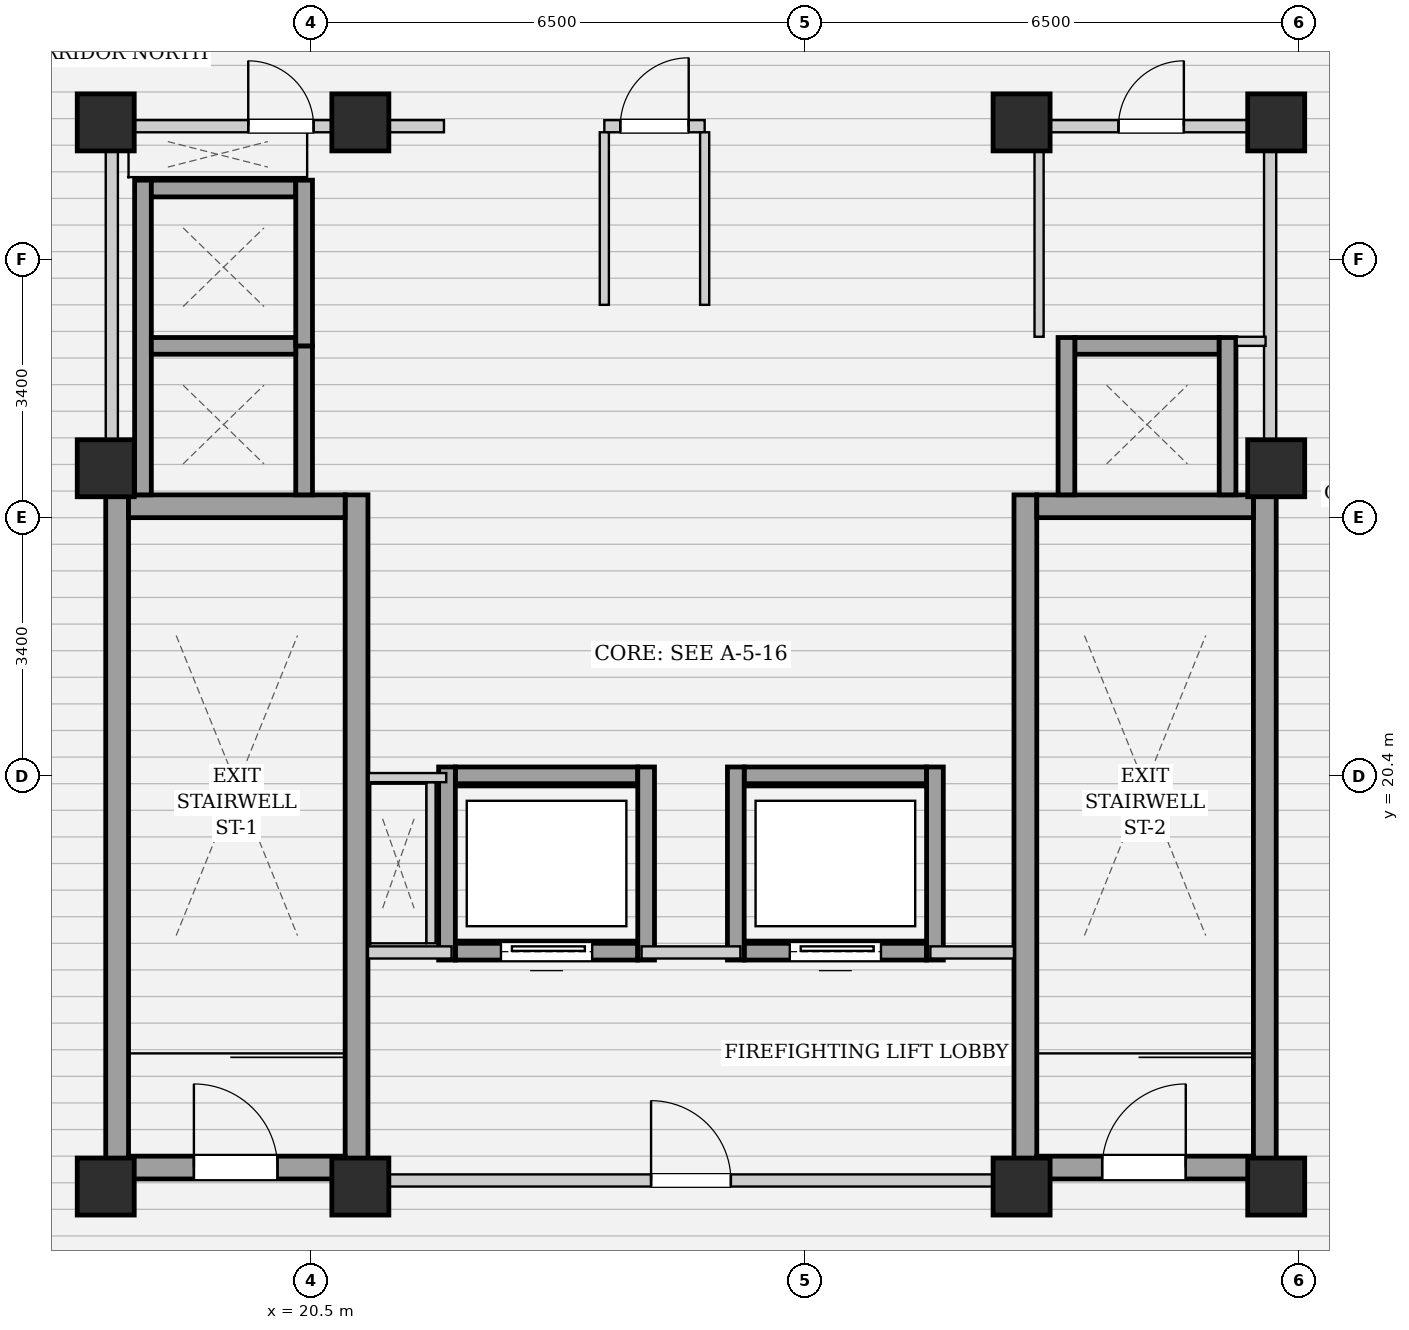
"""IFC4 building model, lengths in metres.
Left out: names, types, materials, properties, quantities, classifications, styles, units other than length and angle.
Written with IfcOpenShell. Run it as: python <this file> out.ifc"""

import sys

from ifc_helpers import new_model, si_unit, direction, frame, frame_2d, origin, origin_2d, place, context, subcontext, project, spatial, rectangle, extrude, element, fill, save


model = new_model("IFC4")
c1 = context("Model", 3, precision=1e-05, world=origin(), true_north=direction((0.0, 1.0)))
c2 = subcontext(c1, "Body", "Model", "MODEL_VIEW")
j1 = project(units=[si_unit("LENGTHUNIT", "METRE"), si_unit("PLANEANGLEUNIT", "RADIAN")], contexts=[c1])
p1 = place(None, origin())
s1 = spatial("IfcSite", under=j1, at=p1, CompositionType="ELEMENT")
p2 = place(p1, origin())
s2 = spatial("IfcBuilding", under=s1, at=p2, CompositionType="ELEMENT")
p3 = place(p2, frame((0.0, 0.0, 261.5)))
s3 = spatial("IfcBuildingStorey", under=s2, at=p3, CompositionType="ELEMENT", Elevation=261.5)
for number, where, z_axis, x_axis in (
    (1, (17.8, 15.0, 0.0), (0.0, 0.0, 1.0), (1.0, 0.0, 0.0)),
    (2, (21.15, 15.0, 0.0), (0.0, 0.0, 1.0), (1.0, 0.0, 0.0)),
    (3, (29.85, 15.0, 0.0), (0.0, 0.0, 1.0), (1.0, 0.0, 0.0)),
    (4, (33.2, 15.0, 0.0), (0.0, 0.0, 1.0), (1.0, 0.0, 0.0)),
    (5, (17.8, 29.0, 0.0), (0.0, 0.0, 1.0), (1.0, 0.0, 0.0)),
    (6, (21.15, 29.0, 0.0), (0.0, 0.0, 1.0), (1.0, 0.0, 0.0)),
    (7, (29.85, 29.0, 0.0), (0.0, 0.0, 1.0), (1.0, 0.0, 0.0)),
    (8, (33.2, 29.0, 0.0), (0.0, 0.0, 1.0), (1.0, 0.0, 0.0)),
    (9, (17.8, 24.45, 0.0), (0.0, 0.0, 1.0), (1.0, 0.0, 0.0)),
    (10, (33.2, 24.45, 0.0), (0.0, 0.0, 1.0), (1.0, 0.0, 0.0)),
):
    element("IfcColumn", number, at=place(p3, frame(where, z_axis=z_axis, x_axis=x_axis)), inside=s3, PredefinedType="COLUMN", context=c2, shape_type="SweptSolid", body=[
        extrude(rectangle(XDim=0.75, YDim=0.75, at=origin_2d()), origin(), (0.0, 0.0, 1.0), 12.95),
    ])
for number, where, z_axis, x_axis in (
    (11, (17.95, 15.1, 0.0), (0.0, 0.0, 1.0), (0.0, 1.0, 0.0)),
    (12, (21.1, 15.1, 0.0), (0.0, 0.0, 1.0), (0.0, 1.0, 0.0)),
):
    element("IfcWall", number, at=place(p3, frame(where, z_axis=z_axis, x_axis=x_axis)), inside=s3, PredefinedType="SHEAR", context=c2, shape_type="SweptSolid", body=[
        extrude(rectangle(XDim=9.0, YDim=0.3, at=frame_2d((4.5, 0.0))), origin(), (0.0, 0.0, 1.0), 13.2),
    ])
p4 = place(p3, frame((18.1, 23.95, 0.0), z_axis=(0.0, 0.0, 1.0), x_axis=(1.0, 0.0, 0.0)))
e13 = element("IfcWall", 13, at=p4, inside=s3, PredefinedType="SHEAR", context=c2, shape_type="SweptSolid", body=[
    extrude(rectangle(XDim=2.85, YDim=0.3, at=frame_2d((1.425, 0.0))), origin(), (0.0, 0.0, 1.0), 13.2),
])
p5 = place(p3, frame((18.1, 15.25, 0.0), z_axis=(0.0, 0.0, 1.0), x_axis=(1.0, 0.0, 0.0)))
e14 = element("IfcWall", 14, at=p5, inside=s3, PredefinedType="SHEAR", context=c2, shape_type="SweptSolid", body=[
    extrude(rectangle(XDim=2.85, YDim=0.3, at=frame_2d((1.425, 0.0))), origin(), (0.0, 0.0, 1.0), 13.2),
])
p6 = place(p5, frame((0.86, 0.0, 0.0)))
e15 = element("IfcOpeningElement", 15, at=p6, cuts=e14, PredefinedType="OPENING", context=c2, shape_type="SweptSolid", body=[
    extrude(rectangle(XDim=1.1, YDim=2.05, at=frame_2d((0.55, 1.025))), frame((0.0, 0.16, 0.0), z_axis=(0.0, -1.0, 0.0), x_axis=(1.0, 0.0, 0.0)), (0.0, 0.0, 1.0), 0.32),
])
for number, where, z_axis, x_axis in (
    (16, (29.9, 15.1, 0.0), (0.0, 0.0, 1.0), (0.0, 1.0, 0.0)),
    (17, (33.05, 15.1, 0.0), (0.0, 0.0, 1.0), (0.0, 1.0, 0.0)),
):
    element("IfcWall", number, at=place(p3, frame(where, z_axis=z_axis, x_axis=x_axis)), inside=s3, PredefinedType="SHEAR", context=c2, shape_type="SweptSolid", body=[
        extrude(rectangle(XDim=9.0, YDim=0.3, at=frame_2d((4.5, 0.0))), origin(), (0.0, 0.0, 1.0), 13.2),
    ])
p7 = place(p3, frame((30.05, 23.95, 0.0), z_axis=(0.0, 0.0, 1.0), x_axis=(1.0, 0.0, 0.0)))
e18 = element("IfcWall", 18, at=p7, inside=s3, PredefinedType="SHEAR", context=c2, shape_type="SweptSolid", body=[
    extrude(rectangle(XDim=2.85, YDim=0.3, at=frame_2d((1.425, 0.0))), origin(), (0.0, 0.0, 1.0), 13.2),
])
p8 = place(p3, frame((30.05, 15.25, 0.0), z_axis=(0.0, 0.0, 1.0), x_axis=(1.0, 0.0, 0.0)))
e19 = element("IfcWall", 19, at=p8, inside=s3, PredefinedType="SHEAR", context=c2, shape_type="SweptSolid", body=[
    extrude(rectangle(XDim=2.85, YDim=0.3, at=frame_2d((1.425, 0.0))), origin(), (0.0, 0.0, 1.0), 13.2),
])
p9 = place(p8, frame((0.86, 0.0, 0.0)))
e20 = element("IfcOpeningElement", 20, at=p9, cuts=e19, PredefinedType="OPENING", context=c2, shape_type="SweptSolid", body=[
    extrude(rectangle(XDim=1.1, YDim=2.05, at=frame_2d((0.55, 1.025))), frame((0.0, 0.16, 0.0), z_axis=(0.0, -1.0, 0.0), x_axis=(1.0, 0.0, 0.0)), (0.0, 0.0, 1.0), 0.32),
])
p10 = place(p3, frame((18.29, 24.1, 0.0), z_axis=(0.0, 0.0, 1.0), x_axis=(0.0, 1.0, 0.0)))
e21 = element("IfcWall", 21, at=p10, inside=s3, PredefinedType="SHEAR", context=c2, shape_type="SweptSolid", body=[
    extrude(rectangle(XDim=4.14, YDim=0.22, at=frame_2d((2.07, 0.0))), origin(), (0.0, 0.0, 1.0), 13.2),
])
p11 = place(p3, frame((20.41, 24.1, 0.0), z_axis=(0.0, 0.0, 1.0), x_axis=(0.0, 1.0, 0.0)))
e22 = element("IfcWall", 22, at=p11, inside=s3, PredefinedType="SHEAR", context=c2, shape_type="SweptSolid", body=[
    extrude(rectangle(XDim=1.96, YDim=0.22, at=frame_2d((0.98, 0.0))), origin(), (0.0, 0.0, 1.0), 13.2),
])
for number, where, z_axis, x_axis in (
    (23, (18.4, 26.06, 0.0), (0.0, 0.0, 1.0), (1.0, 0.0, 0.0)),
    (24, (18.4, 28.13, 0.0), (0.0, 0.0, 1.0), (1.0, 0.0, 0.0)),
):
    element("IfcWall", number, at=place(p3, frame(where, z_axis=z_axis, x_axis=x_axis)), inside=s3, PredefinedType="SHEAR", context=c2, shape_type="SweptSolid", body=[
        extrude(rectangle(XDim=1.9, YDim=0.22, at=frame_2d((0.95, 0.0))), origin(), (0.0, 0.0, 1.0), 13.2),
    ])
p12 = place(p3, frame((20.41, 26.06, 0.0), z_axis=(0.0, 0.0, 1.0), x_axis=(0.0, 1.0, 0.0)))
e25 = element("IfcWall", 25, at=p12, inside=s3, PredefinedType="SHEAR", context=c2, shape_type="SweptSolid", body=[
    extrude(rectangle(XDim=2.18, YDim=0.22, at=frame_2d((1.09, 0.0))), origin(), (0.0, 0.0, 1.0), 13.2),
])
p13 = place(p3, frame((30.55, 26.06, 0.0), z_axis=(0.0, 0.0, 1.0), x_axis=(1.0, 0.0, 0.0)))
e26 = element("IfcWall", 26, at=p13, inside=s3, PredefinedType="SHEAR", context=c2, shape_type="SweptSolid", body=[
    extrude(rectangle(XDim=1.9, YDim=0.22, at=frame_2d((0.95, 0.0))), origin(), (0.0, 0.0, 1.0), 13.2),
])
for number, where, z_axis, x_axis in (
    (27, (30.44, 24.1, 0.0), (0.0, 0.0, 1.0), (0.0, 1.0, 0.0)),
    (28, (32.56, 24.1, 0.0), (0.0, 0.0, 1.0), (0.0, 1.0, 0.0)),
):
    element("IfcWall", number, at=place(p3, frame(where, z_axis=z_axis, x_axis=x_axis)), inside=s3, PredefinedType="SHEAR", context=c2, shape_type="SweptSolid", body=[
        extrude(rectangle(XDim=2.07, YDim=0.22, at=frame_2d((1.035, 0.0))), origin(), (0.0, 0.0, 1.0), 13.2),
    ])
p14 = place(p3, frame((22.4, 18.09, 0.0), z_axis=(0.0, 0.0, 1.0), x_axis=(1.0, 0.0, 0.0)))
e29 = element("IfcWall", 29, at=p14, inside=s3, PredefinedType="SHEAR", context=c2, shape_type="SweptSolid", body=[
    extrude(rectangle(XDim=2.4, YDim=0.22, at=frame_2d((1.2, 0.0))), origin(), (0.0, 0.0, 1.0), 13.2),
])
p15 = place(p14, frame((0.6, 0.0, 0.0)))
e30 = element("IfcOpeningElement", 30, at=p15, cuts=e29, PredefinedType="OPENING", context=c2, shape_type="SweptSolid", body=[
    extrude(rectangle(XDim=1.2, YDim=2.15, at=frame_2d((0.6, 1.075))), frame((0.0, 0.12, 0.0), z_axis=(0.0, -1.0, 0.0), x_axis=(1.0, 0.0, 0.0)), (0.0, 0.0, 1.0), 0.24),
])
p16 = place(p3, frame((22.4, 20.41, 0.0), z_axis=(0.0, 0.0, 1.0), x_axis=(1.0, 0.0, 0.0)))
e31 = element("IfcWall", 31, at=p16, inside=s3, PredefinedType="SHEAR", context=c2, shape_type="SweptSolid", body=[
    extrude(rectangle(XDim=2.4, YDim=0.22, at=frame_2d((1.2, 0.0))), origin(), (0.0, 0.0, 1.0), 13.2),
])
for number, where, z_axis, x_axis in (
    (32, (22.29, 17.98, 0.0), (0.0, 0.0, 1.0), (0.0, 1.0, 0.0)),
    (33, (24.91, 17.98, 0.0), (0.0, 0.0, 1.0), (0.0, 1.0, 0.0)),
):
    element("IfcWall", number, at=place(p3, frame(where, z_axis=z_axis, x_axis=x_axis)), inside=s3, PredefinedType="SHEAR", context=c2, shape_type="SweptSolid", body=[
        extrude(rectangle(XDim=2.54, YDim=0.22, at=frame_2d((1.27, 0.0))), origin(), (0.0, 0.0, 1.0), 13.2),
    ])
p17 = place(p3, frame((26.2, 18.09, 0.0), z_axis=(0.0, 0.0, 1.0), x_axis=(1.0, 0.0, 0.0)))
e34 = element("IfcWall", 34, at=p17, inside=s3, PredefinedType="SHEAR", context=c2, shape_type="SweptSolid", body=[
    extrude(rectangle(XDim=2.4, YDim=0.22, at=frame_2d((1.2, 0.0))), origin(), (0.0, 0.0, 1.0), 13.2),
])
p18 = place(p17, frame((0.6, 0.0, 0.0)))
e35 = element("IfcOpeningElement", 35, at=p18, cuts=e34, PredefinedType="OPENING", context=c2, shape_type="SweptSolid", body=[
    extrude(rectangle(XDim=1.2, YDim=2.15, at=frame_2d((0.6, 1.075))), frame((0.0, 0.12, 0.0), z_axis=(0.0, -1.0, 0.0), x_axis=(1.0, 0.0, 0.0)), (0.0, 0.0, 1.0), 0.24),
])
p19 = place(p3, frame((26.2, 20.41, 0.0), z_axis=(0.0, 0.0, 1.0), x_axis=(1.0, 0.0, 0.0)))
e36 = element("IfcWall", 36, at=p19, inside=s3, PredefinedType="SHEAR", context=c2, shape_type="SweptSolid", body=[
    extrude(rectangle(XDim=2.4, YDim=0.22, at=frame_2d((1.2, 0.0))), origin(), (0.0, 0.0, 1.0), 13.2),
])
for number, where, z_axis, x_axis in (
    (37, (26.09, 17.98, 0.0), (0.0, 0.0, 1.0), (0.0, 1.0, 0.0)),
    (38, (28.71, 17.98, 0.0), (0.0, 0.0, 1.0), (0.0, 1.0, 0.0)),
):
    element("IfcWall", number, at=place(p3, frame(where, z_axis=z_axis, x_axis=x_axis)), inside=s3, PredefinedType="SHEAR", context=c2, shape_type="SweptSolid", body=[
        extrude(rectangle(XDim=2.54, YDim=0.22, at=frame_2d((1.27, 0.0))), origin(), (0.0, 0.0, 1.0), 13.2),
    ])
p20 = place(p3, frame((21.25, 15.08, 0.0), z_axis=(0.0, 0.0, 1.0), x_axis=(1.0, 0.0, 0.0)))
e39 = element("IfcWall", 39, at=p20, inside=s3, PredefinedType="PARTITIONING", context=c2, shape_type="SweptSolid", body=[
    extrude(rectangle(XDim=8.5, YDim=0.16, at=frame_2d((4.25, 0.0))), origin(), (0.0, 0.0, 1.0), 12.319),
])
p21 = place(p20, frame((3.725, 0.0, 0.0)))
e40 = element("IfcOpeningElement", 40, at=p21, cuts=e39, PredefinedType="OPENING", context=c2, shape_type="SweptSolid", body=[
    extrude(rectangle(XDim=1.05, YDim=2.05, at=frame_2d((0.525, 1.025))), frame((0.0, 0.09, 0.0), z_axis=(0.0, -1.0, 0.0), x_axis=(1.0, 0.0, 0.0)), (0.0, 0.0, 1.0), 0.18),
])
p22 = place(p3, frame((21.25, 18.08, 0.0), z_axis=(0.0, 0.0, 1.0), x_axis=(1.0, 0.0, 0.0)))
e41 = element("IfcWall", 41, at=p22, inside=s3, PredefinedType="PARTITIONING", context=c2, shape_type="SweptSolid", body=[
    extrude(rectangle(XDim=1.1, YDim=0.16, at=frame_2d((0.55, 0.0))), origin(), (0.0, 0.0, 1.0), 13.2),
])
p23 = place(p3, frame((24.85, 18.08, 0.0), z_axis=(0.0, 0.0, 1.0), x_axis=(1.0, 0.0, 0.0)))
e42 = element("IfcWall", 42, at=p23, inside=s3, PredefinedType="PARTITIONING", context=c2, shape_type="SweptSolid", body=[
    extrude(rectangle(XDim=1.3, YDim=0.16, at=frame_2d((0.65, 0.0))), origin(), (0.0, 0.0, 1.0), 13.2),
])
p24 = place(p3, frame((28.65, 18.08, 0.0), z_axis=(0.0, 0.0, 1.0), x_axis=(1.0, 0.0, 0.0)))
e43 = element("IfcWall", 43, at=p24, inside=s3, PredefinedType="PARTITIONING", context=c2, shape_type="SweptSolid", body=[
    extrude(rectangle(XDim=1.1, YDim=0.16, at=frame_2d((0.55, 0.0))), origin(), (0.0, 0.0, 1.0), 13.2),
])
for number, where, z_axis, x_axis in (
    (44, (17.88, 24.12, 0.0), (0.0, 0.0, 1.0), (0.0, 1.0, 0.0)),
    (45, (33.12, 24.12, 0.0), (0.0, 0.0, 1.0), (0.0, 1.0, 0.0)),
):
    element("IfcWall", number, at=place(p3, frame(where, z_axis=z_axis, x_axis=x_axis)), inside=s3, PredefinedType="PARTITIONING", context=c2, shape_type="SweptSolid", body=[
        extrude(rectangle(XDim=4.76, YDim=0.16, at=frame_2d((2.38, 0.0))), origin(), (0.0, 0.0, 1.0), 12.319),
    ])
p25 = place(p3, frame((24.36, 28.95, 0.0), z_axis=(0.0, 0.0, 1.0), x_axis=(1.0, 0.0, 0.0)))
e46 = element("IfcWall", 46, at=p25, inside=s3, PredefinedType="PARTITIONING", context=c2, shape_type="SweptSolid", body=[
    extrude(rectangle(XDim=1.32, YDim=0.16, at=frame_2d((0.66, 0.0))), origin(), (0.0, 0.0, 1.0), 12.319),
])
p26 = place(p25, frame((0.21, 0.0, 0.0)))
e47 = element("IfcOpeningElement", 47, at=p26, cuts=e46, PredefinedType="OPENING", context=c2, shape_type="SweptSolid", body=[
    extrude(rectangle(XDim=0.9, YDim=2.05, at=frame_2d((0.45, 1.025))), frame((0.0, 0.09, 0.0), z_axis=(0.0, -1.0, 0.0), x_axis=(1.0, 0.0, 0.0)), (0.0, 0.0, 1.0), 0.18),
])
p27 = place(p3, frame((17.96, 28.95, 0.0), z_axis=(0.0, 0.0, 1.0), x_axis=(1.0, 0.0, 0.0)))
e48 = element("IfcWall", 48, at=p27, inside=s3, PredefinedType="PARTITIONING", context=c2, shape_type="SweptSolid", body=[
    extrude(rectangle(XDim=4.29, YDim=0.16, at=frame_2d((2.145, 0.0))), origin(), (0.0, 0.0, 1.0), 12.319),
])
p28 = place(p27, frame((1.715, 0.0, 0.0)))
e49 = element("IfcOpeningElement", 49, at=p28, cuts=e48, PredefinedType="OPENING", context=c2, shape_type="SweptSolid", body=[
    extrude(rectangle(XDim=0.86, YDim=2.05, at=frame_2d((0.43, 1.025))), frame((0.0, 0.09, 0.0), z_axis=(0.0, -1.0, 0.0), x_axis=(1.0, 0.0, 0.0)), (0.0, 0.0, 1.0), 0.18),
])
p29 = place(p3, frame((22.08, 18.2, 0.0), z_axis=(0.0, 0.0, 1.0), x_axis=(0.0, 1.0, 0.0)))
e50 = element("IfcWall", 50, at=p29, inside=s3, PredefinedType="PARTITIONING", context=c2, shape_type="SweptSolid", body=[
    extrude(rectangle(XDim=2.12, YDim=0.12, at=frame_2d((1.06, 0.0))), origin(), (0.0, 0.0, 1.0), 13.2),
])
p30 = place(p3, frame((22.28, 20.38, 0.0), z_axis=(0.0, 0.0, 1.0), x_axis=(-1.0, 0.0, 0.0)))
e51 = element("IfcWall", 51, at=p30, inside=s3, PredefinedType="PARTITIONING", context=c2, shape_type="SweptSolid", body=[
    extrude(rectangle(XDim=1.02, YDim=0.12, at=frame_2d((0.51, 0.0))), origin(), (0.0, 0.0, 1.0), 13.2),
])
for number, where, z_axis, x_axis in (
    (52, (24.36, 26.6, 0.0), (0.0, 0.0, 1.0), (0.0, 1.0, 0.0)),
    (53, (25.68, 26.6, 0.0), (0.0, 0.0, 1.0), (0.0, 1.0, 0.0)),
):
    element("IfcWall", number, at=place(p3, frame(where, z_axis=z_axis, x_axis=x_axis)), inside=s3, PredefinedType="PARTITIONING", context=c2, shape_type="SweptSolid", body=[
        extrude(rectangle(XDim=2.27, YDim=0.12, at=frame_2d((1.135, 0.0))), origin(), (0.0, 0.0, 1.0), 13.2),
    ])
p31 = place(p3, frame((30.08, 26.18, 0.0), z_axis=(0.0, 0.0, 1.0), x_axis=(0.0, 1.0, 0.0)))
e54 = element("IfcWall", 54, at=p31, inside=s3, PredefinedType="PARTITIONING", context=c2, shape_type="SweptSolid", body=[
    extrude(rectangle(XDim=2.68, YDim=0.12, at=frame_2d((1.34, 0.0))), origin(), (0.0, 0.0, 1.0), 13.2),
])
p32 = place(p3, frame((32.68, 26.12, 0.0), z_axis=(0.0, 0.0, 1.0), x_axis=(1.0, 0.0, 0.0)))
e55 = element("IfcWall", 55, at=p32, inside=s3, PredefinedType="PARTITIONING", context=c2, shape_type="SweptSolid", body=[
    extrude(rectangle(XDim=0.38, YDim=0.12, at=frame_2d((0.19, 0.0))), origin(), (0.0, 0.0, 1.0), 13.2),
])
p33 = place(p3, frame((30.08, 28.95, 0.0), z_axis=(0.0, 0.0, 1.0), x_axis=(1.0, 0.0, 0.0)))
e56 = element("IfcWall", 56, at=p33, inside=s3, PredefinedType="PARTITIONING", context=c2, shape_type="SweptSolid", body=[
    extrude(rectangle(XDim=2.96, YDim=0.16, at=frame_2d((1.48, 0.0))), origin(), (0.0, 0.0, 1.0), 13.2),
])
p34 = place(p33, frame((1.045, 0.0, 0.0)))
e57 = element("IfcOpeningElement", 57, at=p34, cuts=e56, PredefinedType="OPENING", context=c2, shape_type="SweptSolid", body=[
    extrude(rectangle(XDim=0.86, YDim=2.05, at=frame_2d((0.43, 1.025))), frame((0.0, 0.09, 0.0), z_axis=(0.0, -1.0, 0.0), x_axis=(1.0, 0.0, 0.0)), (0.0, 0.0, 1.0), 0.18),
])
p35 = place(p6, origin())
e58 = element("IfcDoor", 58, at=p35, inside=s3, OperationType="SINGLE_SWING_LEFT", PredefinedType="DOOR", context=c2, shape_type="SweptSolid", body=[
    extrude(rectangle(XDim=1.1, YDim=2.05, at=frame_2d((0.55, 1.025))), frame((0.0, 0.025, 0.0), z_axis=(0.0, -1.0, 0.0), x_axis=(1.0, 0.0, 0.0)), (0.0, 0.0, 1.0), 0.05),
])
fill(e15, e58)
p36 = place(p9, origin())
e59 = element("IfcDoor", 59, at=p36, inside=s3, OperationType="SINGLE_SWING_RIGHT", PredefinedType="DOOR", context=c2, shape_type="SweptSolid", body=[
    extrude(rectangle(XDim=1.1, YDim=2.05, at=frame_2d((0.55, 1.025))), frame((0.0, 0.025, 0.0), z_axis=(0.0, -1.0, 0.0), x_axis=(1.0, 0.0, 0.0)), (0.0, 0.0, 1.0), 0.05),
])
fill(e20, e59)
p37 = place(p15, origin())
e60 = element("IfcDoor", 60, at=p37, inside=s3, OperationType="SLIDING_TO_LEFT", PredefinedType="DOOR", context=c2, shape_type="SweptSolid", body=[
    extrude(rectangle(XDim=1.2, YDim=2.15, at=frame_2d((0.6, 1.075))), frame((0.0, 0.025, 0.0), z_axis=(0.0, -1.0, 0.0), x_axis=(1.0, 0.0, 0.0)), (0.0, 0.0, 1.0), 0.05),
])
fill(e30, e60)
p38 = place(p18, origin())
e61 = element("IfcDoor", 61, at=p38, inside=s3, OperationType="SLIDING_TO_LEFT", PredefinedType="DOOR", context=c2, shape_type="SweptSolid", body=[
    extrude(rectangle(XDim=1.2, YDim=2.15, at=frame_2d((0.6, 1.075))), frame((0.0, 0.025, 0.0), z_axis=(0.0, -1.0, 0.0), x_axis=(1.0, 0.0, 0.0)), (0.0, 0.0, 1.0), 0.05),
])
fill(e35, e61)
p39 = place(p21, origin())
e62 = element("IfcDoor", 62, at=p39, inside=s3, OperationType="SINGLE_SWING_LEFT", PredefinedType="DOOR", context=c2, shape_type="SweptSolid", body=[
    extrude(rectangle(XDim=1.05, YDim=2.05, at=frame_2d((0.525, 1.025))), frame((0.0, 0.025, 0.0), z_axis=(0.0, -1.0, 0.0), x_axis=(1.0, 0.0, 0.0)), (0.0, 0.0, 1.0), 0.05),
])
fill(e40, e62)
p40 = place(p26, origin())
e63 = element("IfcDoor", 63, at=p40, inside=s3, OperationType="SINGLE_SWING_RIGHT", PredefinedType="DOOR", context=c2, shape_type="SweptSolid", body=[
    extrude(rectangle(XDim=0.9, YDim=2.05, at=frame_2d((0.45, 1.025))), frame((0.0, 0.025, 0.0), z_axis=(0.0, -1.0, 0.0), x_axis=(1.0, 0.0, 0.0)), (0.0, 0.0, 1.0), 0.05),
])
fill(e47, e63)
p41 = place(p28, origin())
e64 = element("IfcDoor", 64, at=p41, inside=s3, OperationType="SINGLE_SWING_LEFT", PredefinedType="DOOR", context=c2, shape_type="SweptSolid", body=[
    extrude(rectangle(XDim=0.86, YDim=2.05, at=frame_2d((0.43, 1.025))), frame((0.0, 0.025, 0.0), z_axis=(0.0, -1.0, 0.0), x_axis=(1.0, 0.0, 0.0)), (0.0, 0.0, 1.0), 0.05),
])
fill(e49, e64)
p42 = place(p34, origin())
e65 = element("IfcDoor", 65, at=p42, inside=s3, OperationType="SINGLE_SWING_RIGHT", PredefinedType="DOOR", context=c2, shape_type="SweptSolid", body=[
    extrude(rectangle(XDim=0.86, YDim=2.05, at=frame_2d((0.43, 1.025))), frame((0.0, 0.025, 0.0), z_axis=(0.0, -1.0, 0.0), x_axis=(1.0, 0.0, 0.0)), (0.0, 0.0, 1.0), 0.05),
])
fill(e57, e65)
save(model, sys.argv[1])
